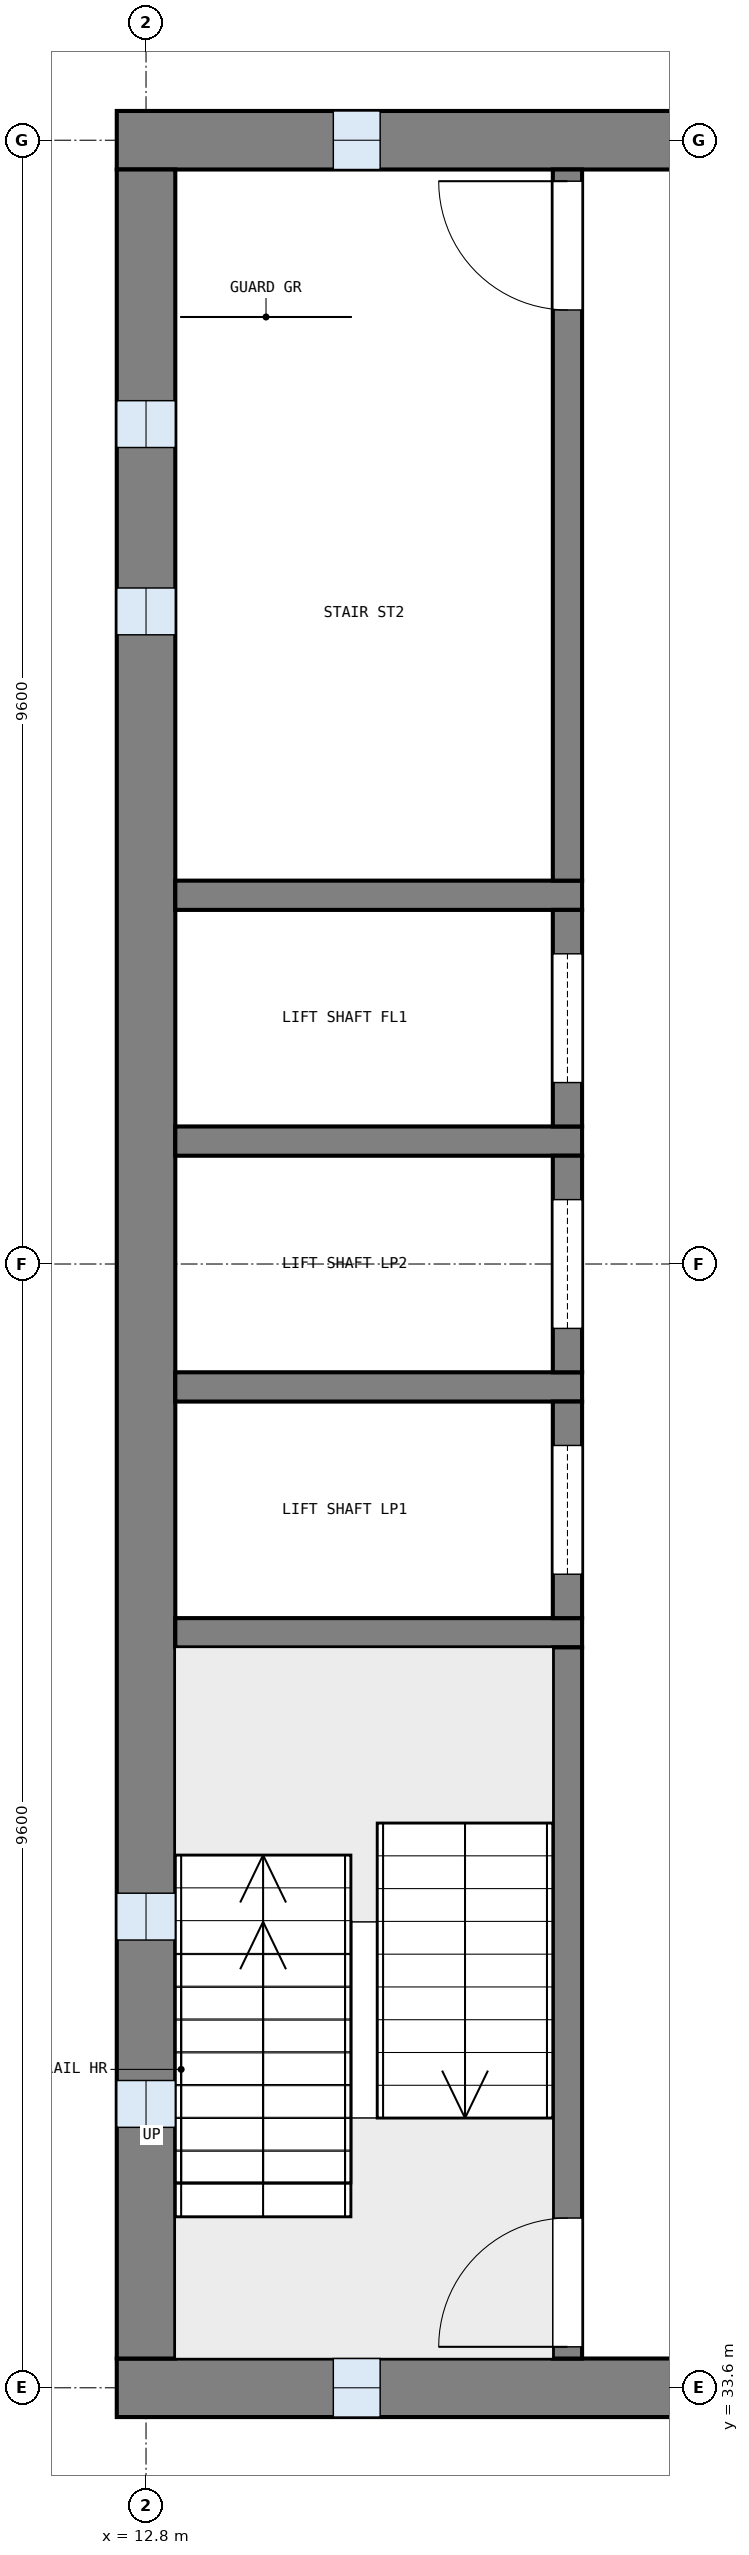
"""IFC4 building model, lengths in metres.
Left out: names, types, materials, properties, quantities, classifications, styles, units other than length and angle.
Written with IfcOpenShell. Run it as: python <this file> out.ifc"""

import sys

from ifc_helpers import new_model, si_unit, direction, frame, frame_2d, origin, place, context, subcontext, project, spatial, rectangle, extrude, element, fill, save


model = new_model("IFC4")
c1 = context("Model", 3, precision=1e-05, world=origin(), true_north=direction((0.0, 1.0)))
c2 = subcontext(c1, "Body", "Model", "MODEL_VIEW")
j1 = project(units=[si_unit("LENGTHUNIT", "METRE"), si_unit("PLANEANGLEUNIT", "RADIAN")], contexts=[c1])
p1 = place(None, origin())
s1 = spatial("IfcSite", under=j1, at=p1, CompositionType="ELEMENT")
p2 = place(p1, origin())
s2 = spatial("IfcBuilding", under=s1, at=p2, CompositionType="ELEMENT")
p3 = place(p2, frame((0.0, 0.0, 64.2)))
s3 = spatial("IfcBuildingStorey", under=s2, at=p3, CompositionType="ELEMENT", Elevation=64.2)
p4 = place(p3, frame((12.55, 52.8, 0.0), z_axis=(0.0, 0.0, 1.0), x_axis=(1.0, 0.0, 0.0)))
e1 = element("IfcWall", 1, at=p4, inside=s3, PredefinedType="SHEAR", context=c2, shape_type="SweptSolid", body=[
    extrude(rectangle(XDim=13.3, YDim=0.5, at=frame_2d((6.65, 0.0))), origin(), (0.0, 0.0, 1.0), 5.1),
])
p5 = place(p4, frame((1.85, 0.0, 1.0)))
e2 = element("IfcOpeningElement", 2, at=p5, cuts=e1, PredefinedType="OPENING", context=c2, shape_type="SweptSolid", body=[
    extrude(rectangle(XDim=0.4, YDim=2.0, at=frame_2d((0.2, 1.0))), frame((0.0, 0.26, 0.0), z_axis=(0.0, -1.0, 0.0), x_axis=(1.0, 0.0, 0.0)), (0.0, 0.0, 1.0), 0.52),
])
p6 = place(p3, frame((12.55, 33.6, 0.0), z_axis=(0.0, 0.0, 1.0), x_axis=(1.0, 0.0, 0.0)))
e3 = element("IfcWall", 3, at=p6, inside=s3, PredefinedType="SHEAR", context=c2, shape_type="SweptSolid", body=[
    extrude(rectangle(XDim=13.3, YDim=0.5, at=frame_2d((6.65, 0.0))), origin(), (0.0, 0.0, 1.0), 5.1),
])
p7 = place(p6, frame((1.85, 0.0, 1.0)))
e4 = element("IfcOpeningElement", 4, at=p7, cuts=e3, PredefinedType="OPENING", context=c2, shape_type="SweptSolid", body=[
    extrude(rectangle(XDim=0.4, YDim=2.0, at=frame_2d((0.2, 1.0))), frame((0.0, 0.26, 0.0), z_axis=(0.0, -1.0, 0.0), x_axis=(1.0, 0.0, 0.0)), (0.0, 0.0, 1.0), 0.52),
])
p8 = place(p3, frame((12.8, 33.85, 0.0), z_axis=(0.0, 0.0, 1.0), x_axis=(0.0, 1.0, 0.0)))
e5 = element("IfcWall", 5, at=p8, inside=s3, PredefinedType="SHEAR", context=c2, shape_type="SweptSolid", body=[
    extrude(rectangle(XDim=18.7, YDim=0.5, at=frame_2d((9.35, 0.0))), origin(), (0.0, 0.0, 1.0), 5.1),
])
p9 = place(p8, frame((1.975, 0.0, 1.0)))
e6 = element("IfcOpeningElement", 6, at=p9, cuts=e5, PredefinedType="OPENING", context=c2, shape_type="SweptSolid", body=[
    extrude(rectangle(XDim=0.4, YDim=2.0, at=frame_2d((0.2, 1.0))), frame((0.0, 0.26, 0.0), z_axis=(0.0, -1.0, 0.0), x_axis=(1.0, 0.0, 0.0)), (0.0, 0.0, 1.0), 0.52),
])
p10 = place(p8, frame((3.575, 0.0, 1.0)))
e7 = element("IfcOpeningElement", 7, at=p10, cuts=e5, PredefinedType="OPENING", context=c2, shape_type="SweptSolid", body=[
    extrude(rectangle(XDim=0.4, YDim=2.0, at=frame_2d((0.2, 1.0))), frame((0.0, 0.26, 0.0), z_axis=(0.0, -1.0, 0.0), x_axis=(1.0, 0.0, 0.0)), (0.0, 0.0, 1.0), 0.52),
])
p11 = place(p8, frame((14.725, 0.0, 1.0)))
e8 = element("IfcOpeningElement", 8, at=p11, cuts=e5, PredefinedType="OPENING", context=c2, shape_type="SweptSolid", body=[
    extrude(rectangle(XDim=0.4, YDim=2.0, at=frame_2d((0.2, 1.0))), frame((0.0, 0.26, 0.0), z_axis=(0.0, -1.0, 0.0), x_axis=(1.0, 0.0, 0.0)), (0.0, 0.0, 1.0), 0.52),
])
p12 = place(p8, frame((16.325, 0.0, 1.0)))
e9 = element("IfcOpeningElement", 9, at=p12, cuts=e5, PredefinedType="OPENING", context=c2, shape_type="SweptSolid", body=[
    extrude(rectangle(XDim=0.4, YDim=2.0, at=frame_2d((0.2, 1.0))), frame((0.0, 0.26, 0.0), z_axis=(0.0, -1.0, 0.0), x_axis=(1.0, 0.0, 0.0)), (0.0, 0.0, 1.0), 0.52),
])
for number, where, z_axis, x_axis in (
    (10, (13.05, 40.05, 0.0), (0.0, 0.0, 1.0), (1.0, 0.0, 0.0)),
    (11, (13.05, 42.15, 0.0), (0.0, 0.0, 1.0), (1.0, 0.0, 0.0)),
    (12, (13.05, 44.25, 0.0), (0.0, 0.0, 1.0), (1.0, 0.0, 0.0)),
    (13, (13.05, 46.35, 0.0), (0.0, 0.0, 1.0), (1.0, 0.0, 0.0)),
):
    element("IfcWall", number, at=place(p3, frame(where, z_axis=z_axis, x_axis=x_axis)), inside=s3, PredefinedType="SOLIDWALL", context=c2, shape_type="SweptSolid", body=[
        extrude(rectangle(XDim=3.475, YDim=0.25, at=frame_2d((1.737, 0.0))), origin(), (0.0, 0.0, 1.0), 5.1),
    ])
p13 = place(p3, frame((16.4, 33.85, 0.0), z_axis=(0.0, 0.0, 1.0), x_axis=(0.0, 1.0, 0.0)))
e14 = element("IfcWall", 14, at=p13, inside=s3, PredefinedType="SOLIDWALL", context=c2, shape_type="SweptSolid", body=[
    extrude(rectangle(XDim=6.075, YDim=0.25, at=frame_2d((3.038, 0.0))), origin(), (0.0, 0.0, 1.0), 5.1),
])
p14 = place(p13, frame((0.1, 0.0, 0.0)))
e15 = element("IfcOpeningElement", 15, at=p14, cuts=e14, PredefinedType="OPENING", context=c2, shape_type="SweptSolid", body=[
    extrude(rectangle(XDim=1.1, YDim=2.1, at=frame_2d((0.55, 1.05))), frame((0.0, 0.135, 0.0), z_axis=(0.0, -1.0, 0.0), x_axis=(1.0, 0.0, 0.0)), (0.0, 0.0, 1.0), 0.27),
])
p15 = place(p3, frame((16.4, 40.175, 0.0), z_axis=(0.0, 0.0, 1.0), x_axis=(0.0, 1.0, 0.0)))
e16 = element("IfcWall", 16, at=p15, inside=s3, PredefinedType="SOLIDWALL", context=c2, shape_type="SweptSolid", body=[
    extrude(rectangle(XDim=1.85, YDim=0.25, at=frame_2d((0.925, 0.0))), origin(), (0.0, 0.0, 1.0), 5.1),
])
p16 = place(p15, frame((0.375, 0.0, 0.0)))
e17 = element("IfcOpeningElement", 17, at=p16, cuts=e16, PredefinedType="OPENING", context=c2, shape_type="SweptSolid", body=[
    extrude(rectangle(XDim=1.1, YDim=2.1, at=frame_2d((0.55, 1.05))), frame((0.0, 0.135, 0.0), z_axis=(0.0, -1.0, 0.0), x_axis=(1.0, 0.0, 0.0)), (0.0, 0.0, 1.0), 0.27),
])
p17 = place(p3, frame((16.4, 42.275, 0.0), z_axis=(0.0, 0.0, 1.0), x_axis=(0.0, 1.0, 0.0)))
e18 = element("IfcWall", 18, at=p17, inside=s3, PredefinedType="SOLIDWALL", context=c2, shape_type="SweptSolid", body=[
    extrude(rectangle(XDim=1.85, YDim=0.25, at=frame_2d((0.925, 0.0))), origin(), (0.0, 0.0, 1.0), 5.1),
])
p18 = place(p17, frame((0.375, 0.0, 0.0)))
e19 = element("IfcOpeningElement", 19, at=p18, cuts=e18, PredefinedType="OPENING", context=c2, shape_type="SweptSolid", body=[
    extrude(rectangle(XDim=1.1, YDim=2.1, at=frame_2d((0.55, 1.05))), frame((0.0, 0.135, 0.0), z_axis=(0.0, -1.0, 0.0), x_axis=(1.0, 0.0, 0.0)), (0.0, 0.0, 1.0), 0.27),
])
p19 = place(p3, frame((16.4, 44.375, 0.0), z_axis=(0.0, 0.0, 1.0), x_axis=(0.0, 1.0, 0.0)))
e20 = element("IfcWall", 20, at=p19, inside=s3, PredefinedType="SOLIDWALL", context=c2, shape_type="SweptSolid", body=[
    extrude(rectangle(XDim=1.85, YDim=0.25, at=frame_2d((0.925, 0.0))), origin(), (0.0, 0.0, 1.0), 5.1),
])
p20 = place(p19, frame((0.375, 0.0, 0.0)))
e21 = element("IfcOpeningElement", 21, at=p20, cuts=e20, PredefinedType="OPENING", context=c2, shape_type="SweptSolid", body=[
    extrude(rectangle(XDim=1.1, YDim=2.1, at=frame_2d((0.55, 1.05))), frame((0.0, 0.135, 0.0), z_axis=(0.0, -1.0, 0.0), x_axis=(1.0, 0.0, 0.0)), (0.0, 0.0, 1.0), 0.27),
])
p21 = place(p3, frame((16.4, 46.475, 0.0), z_axis=(0.0, 0.0, 1.0), x_axis=(0.0, 1.0, 0.0)))
e22 = element("IfcWall", 22, at=p21, inside=s3, PredefinedType="SOLIDWALL", context=c2, shape_type="SweptSolid", body=[
    extrude(rectangle(XDim=6.075, YDim=0.25, at=frame_2d((3.038, 0.0))), origin(), (0.0, 0.0, 1.0), 5.1),
])
p22 = place(p21, frame((4.875, 0.0, 0.0)))
e23 = element("IfcOpeningElement", 23, at=p22, cuts=e22, PredefinedType="OPENING", context=c2, shape_type="SweptSolid", body=[
    extrude(rectangle(XDim=1.1, YDim=2.1, at=frame_2d((0.55, 1.05))), frame((0.0, 0.135, 0.0), z_axis=(0.0, -1.0, 0.0), x_axis=(1.0, 0.0, 0.0)), (0.0, 0.0, 1.0), 0.27),
])
p23 = place(p9, origin())
e24 = element("IfcWindow", 24, at=p23, inside=s3, PartitioningType="SINGLE_PANEL", PredefinedType="WINDOW", context=c2, shape_type="SweptSolid", body=[
    extrude(rectangle(XDim=0.4, YDim=2.0, at=frame_2d((0.2, 1.0))), frame((0.0, 0.03, 0.0), z_axis=(0.0, -1.0, 0.0), x_axis=(1.0, 0.0, 0.0)), (0.0, 0.0, 1.0), 0.06),
])
fill(e6, e24)
p24 = place(p10, origin())
e25 = element("IfcWindow", 25, at=p24, inside=s3, PartitioningType="SINGLE_PANEL", PredefinedType="WINDOW", context=c2, shape_type="SweptSolid", body=[
    extrude(rectangle(XDim=0.4, YDim=2.0, at=frame_2d((0.2, 1.0))), frame((0.0, 0.03, 0.0), z_axis=(0.0, -1.0, 0.0), x_axis=(1.0, 0.0, 0.0)), (0.0, 0.0, 1.0), 0.06),
])
fill(e7, e25)
p25 = place(p11, origin())
e26 = element("IfcWindow", 26, at=p25, inside=s3, PartitioningType="SINGLE_PANEL", PredefinedType="WINDOW", context=c2, shape_type="SweptSolid", body=[
    extrude(rectangle(XDim=0.4, YDim=2.0, at=frame_2d((0.2, 1.0))), frame((0.0, 0.03, 0.0), z_axis=(0.0, -1.0, 0.0), x_axis=(1.0, 0.0, 0.0)), (0.0, 0.0, 1.0), 0.06),
])
fill(e8, e26)
p26 = place(p12, origin())
e27 = element("IfcWindow", 27, at=p26, inside=s3, PartitioningType="SINGLE_PANEL", PredefinedType="WINDOW", context=c2, shape_type="SweptSolid", body=[
    extrude(rectangle(XDim=0.4, YDim=2.0, at=frame_2d((0.2, 1.0))), frame((0.0, 0.03, 0.0), z_axis=(0.0, -1.0, 0.0), x_axis=(1.0, 0.0, 0.0)), (0.0, 0.0, 1.0), 0.06),
])
fill(e9, e27)
p27 = place(p7, origin())
e28 = element("IfcWindow", 28, at=p27, inside=s3, PartitioningType="SINGLE_PANEL", PredefinedType="WINDOW", context=c2, shape_type="SweptSolid", body=[
    extrude(rectangle(XDim=0.4, YDim=2.0, at=frame_2d((0.2, 1.0))), frame((0.0, 0.03, 0.0), z_axis=(0.0, -1.0, 0.0), x_axis=(1.0, 0.0, 0.0)), (0.0, 0.0, 1.0), 0.06),
])
fill(e4, e28)
p28 = place(p5, origin())
e29 = element("IfcWindow", 29, at=p28, inside=s3, PartitioningType="SINGLE_PANEL", PredefinedType="WINDOW", context=c2, shape_type="SweptSolid", body=[
    extrude(rectangle(XDim=0.4, YDim=2.0, at=frame_2d((0.2, 1.0))), frame((0.0, 0.03, 0.0), z_axis=(0.0, -1.0, 0.0), x_axis=(1.0, 0.0, 0.0)), (0.0, 0.0, 1.0), 0.06),
])
fill(e2, e29)
p29 = place(p2, frame((0.0, 0.0, 69.3)))
p30 = place(p29, frame((16.4, 33.85, 0.3), z_axis=(0.0, 0.0, 1.0), x_axis=(0.0, 1.0, 0.0)))
p31 = place(p30, frame((4.712, 0.0, 0.13)))
p32 = place(p31, frame((1.1, 0.0, 0.0), z_axis=(0.0, 0.0, 1.0), x_axis=(-1.0, 0.0, 0.0)))
e30 = element("IfcDoor", 30, at=p32, inside=s3, OperationType="SINGLE_SWING_RIGHT", PredefinedType="DOOR", context=c2, shape_type="SweptSolid", body=[
    extrude(rectangle(XDim=1.1, YDim=2.1, at=frame_2d((0.55, 1.05))), frame((0.0, 0.025, 0.0), z_axis=(0.0, -1.0, 0.0), x_axis=(1.0, 0.0, 0.0)), (0.0, 0.0, 1.0), 0.05),
])
p33 = place(p14, origin())
e31 = element("IfcDoor", 31, at=p33, inside=s3, OperationType="SINGLE_SWING_LEFT", PredefinedType="DOOR", context=c2, shape_type="SweptSolid", body=[
    extrude(rectangle(XDim=1.1, YDim=2.1, at=frame_2d((0.55, 1.05))), frame((0.0, 0.025, 0.0), z_axis=(0.0, -1.0, 0.0), x_axis=(1.0, 0.0, 0.0)), (0.0, 0.0, 1.0), 0.05),
])
fill(e15, e31)
p34 = place(p22, origin())
e32 = element("IfcDoor", 32, at=p34, inside=s3, OperationType="SINGLE_SWING_RIGHT", PredefinedType="DOOR", context=c2, shape_type="SweptSolid", body=[
    extrude(rectangle(XDim=1.1, YDim=2.1, at=frame_2d((0.55, 1.05))), frame((0.0, 0.025, 0.0), z_axis=(0.0, -1.0, 0.0), x_axis=(1.0, 0.0, 0.0)), (0.0, 0.0, 1.0), 0.05),
])
fill(e23, e32)
p35 = place(p16, origin())
e33 = element("IfcDoor", 33, at=p35, inside=s3, OperationType="SLIDING_TO_LEFT", PredefinedType="DOOR", context=c2, shape_type="SweptSolid", body=[
    extrude(rectangle(XDim=1.1, YDim=2.1, at=frame_2d((0.55, 1.05))), frame((0.0, 0.025, 0.0), z_axis=(0.0, -1.0, 0.0), x_axis=(1.0, 0.0, 0.0)), (0.0, 0.0, 1.0), 0.05),
])
fill(e17, e33)
p36 = place(p18, origin())
e34 = element("IfcDoor", 34, at=p36, inside=s3, OperationType="SLIDING_TO_LEFT", PredefinedType="DOOR", context=c2, shape_type="SweptSolid", body=[
    extrude(rectangle(XDim=1.1, YDim=2.1, at=frame_2d((0.55, 1.05))), frame((0.0, 0.025, 0.0), z_axis=(0.0, -1.0, 0.0), x_axis=(1.0, 0.0, 0.0)), (0.0, 0.0, 1.0), 0.05),
])
fill(e19, e34)
p37 = place(p20, origin())
e35 = element("IfcDoor", 35, at=p37, inside=s3, OperationType="SLIDING_TO_LEFT", PredefinedType="DOOR", context=c2, shape_type="SweptSolid", body=[
    extrude(rectangle(XDim=1.1, YDim=2.1, at=frame_2d((0.55, 1.05))), frame((0.0, 0.025, 0.0), z_axis=(0.0, -1.0, 0.0), x_axis=(1.0, 0.0, 0.0)), (0.0, 0.0, 1.0), 0.05),
])
fill(e21, e35)
save(model, sys.argv[1])
